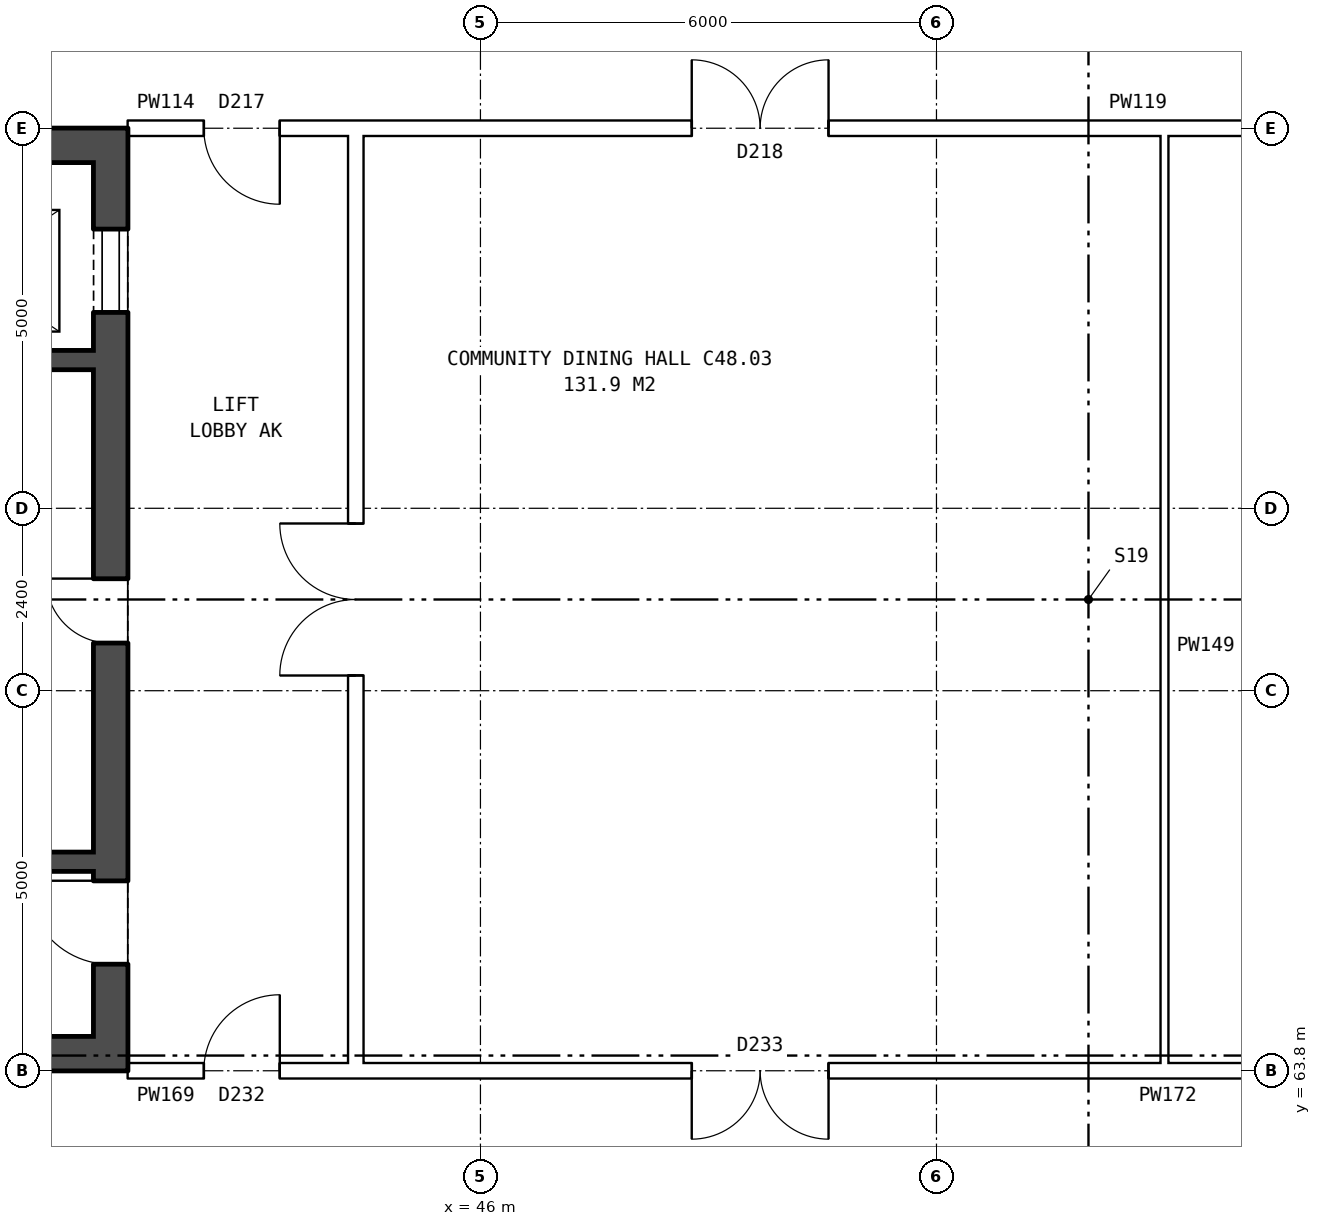
"""IFC4 building model, lengths in metres.
Left out: names, types, materials, properties, quantities, classifications, styles, units other than length and angle.
Written with IfcOpenShell. Run it as: python <this file> out.ifc"""

import sys

from ifc_helpers import new_model, si_unit, direction, frame, frame_2d, origin, place, context, subcontext, project, spatial, rectangle, extrude, element, fill, save


model = new_model("IFC4")
c1 = context("Model", 3, precision=1e-05, world=origin(), true_north=direction((0.0, 1.0)))
c2 = subcontext(c1, "Body", "Model", "MODEL_VIEW")
j1 = project(units=[si_unit("LENGTHUNIT", "METRE"), si_unit("PLANEANGLEUNIT", "RADIAN")], contexts=[c1])
p1 = place(None, origin())
s1 = spatial("IfcSite", under=j1, at=p1, CompositionType="ELEMENT")
p2 = place(p1, origin())
s2 = spatial("IfcBuilding", under=s1, at=p2, CompositionType="ELEMENT")
p3 = place(p2, frame((0.0, 0.0, 171.6)))
s3 = spatial("IfcBuildingStorey", under=s2, at=p3, CompositionType="ELEMENT", Elevation=171.6)
p4 = place(p3, frame((41.135, 76.2, 0.0), z_axis=(0.0, 0.0, 1.0), x_axis=(0.0, -1.0, 0.0)))
e1 = element("IfcWall", 1, at=p4, inside=s3, PredefinedType="SHEAR", context=c2, shape_type="SweptSolid", body=[
    extrude(rectangle(XDim=12.4, YDim=0.45, at=frame_2d((6.2, 0.0))), origin(), (0.0, 0.0, 1.0), 3.6),
])
p5 = place(p4, frame((1.325, 0.0, 0.0)))
e2 = element("IfcOpeningElement", 2, at=p5, cuts=e1, PredefinedType="OPENING", context=c2, shape_type="SweptSolid", body=[
    extrude(rectangle(XDim=1.1, YDim=2.1, at=frame_2d((0.55, 1.05))), frame((0.0, 0.235, 0.0), z_axis=(0.0, -1.0, 0.0), x_axis=(1.0, 0.0, 0.0)), (0.0, 0.0, 1.0), 0.47),
])
p6 = place(p4, frame((5.925, 0.0, 0.0)))
e3 = element("IfcOpeningElement", 3, at=p6, cuts=e1, PredefinedType="OPENING", context=c2, shape_type="SweptSolid", body=[
    extrude(rectangle(XDim=0.85, YDim=2.1, at=frame_2d((0.425, 1.05))), frame((0.0, 0.235, 0.0), z_axis=(0.0, -1.0, 0.0), x_axis=(1.0, 0.0, 0.0)), (0.0, 0.0, 1.0), 0.47),
])
p7 = place(p4, frame((9.9, 0.0, 0.0)))
e4 = element("IfcOpeningElement", 4, at=p7, cuts=e1, PredefinedType="OPENING", context=c2, shape_type="SweptSolid", body=[
    extrude(rectangle(XDim=1.1, YDim=2.1, at=frame_2d((0.55, 1.05))), frame((0.0, 0.235, 0.0), z_axis=(0.0, -1.0, 0.0), x_axis=(1.0, 0.0, 0.0)), (0.0, 0.0, 1.0), 0.47),
])
for number, where, z_axis, x_axis in (
    (5, (40.91, 75.975, 0.0), (0.0, 0.0, 1.0), (-1.0, 0.0, 0.0)),
    (6, (40.91, 64.025, 0.0), (0.0, 0.0, 1.0), (-1.0, 0.0, 0.0)),
):
    element("IfcWall", number, at=place(p3, frame(where, z_axis=z_axis, x_axis=x_axis)), inside=s3, PredefinedType="SHEAR", context=c2, shape_type="SweptSolid", body=[
        extrude(rectangle(XDim=8.1, YDim=0.45, at=frame_2d((4.05, 0.0))), origin(), (0.0, 0.0, 1.0), 3.6),
    ])
p8 = place(p3, frame((40.91, 73.15, 0.0), z_axis=(0.0, 0.0, 1.0), x_axis=(-1.0, 0.0, 0.0)))
e7 = element("IfcWall", 7, at=p8, inside=s3, PredefinedType="SHEAR", context=c2, shape_type="SweptSolid", body=[
    extrude(rectangle(XDim=3.545, YDim=0.25, at=frame_2d((1.772, 0.0))), origin(), (0.0, 0.0, 1.0), 3.6),
])
p9 = place(p3, frame((40.91, 66.55, 0.0), z_axis=(0.0, 0.0, 1.0), x_axis=(-1.0, 0.0, 0.0)))
e8 = element("IfcWall", 8, at=p9, inside=s3, PredefinedType="SHEAR", context=c2, shape_type="SweptSolid", body=[
    extrude(rectangle(XDim=2.475, YDim=0.25, at=frame_2d((1.237, 0.0))), origin(), (0.0, 0.0, 1.0), 3.6),
])
p10 = place(p3, frame((44.36, 63.9, 0.0), z_axis=(0.0, 0.0, 1.0), x_axis=(0.0, 1.0, 0.0)))
e9 = element("IfcWall", 9, at=p10, inside=s3, PredefinedType="PARTITIONING", context=c2, shape_type="SweptSolid", body=[
    extrude(rectangle(XDim=12.2, YDim=0.2, at=frame_2d((6.1, 0.0))), origin(), (0.0, 0.0, 1.0), 3.6),
])
p11 = place(p10, frame((5.1, 0.0, 0.0)))
e10 = element("IfcOpeningElement", 10, at=p11, cuts=e9, PredefinedType="OPENING", context=c2, shape_type="SweptSolid", body=[
    extrude(rectangle(XDim=2.0, YDim=2.1, at=frame_2d((1.0, 1.05))), frame((0.0, 0.11, 0.0), z_axis=(0.0, -1.0, 0.0), x_axis=(1.0, 0.0, 0.0)), (0.0, 0.0, 1.0), 0.22),
])
p12 = place(p3, frame((44.36, 63.8, 0.0), z_axis=(0.0, 0.0, 1.0), x_axis=(1.0, 0.0, 0.0)))
e11 = element("IfcWall", 11, at=p12, inside=s3, PredefinedType="PARTITIONING", context=c2, shape_type="SweptSolid", body=[
    extrude(rectangle(XDim=19.28, YDim=0.2, at=frame_2d((9.64, 0.0))), origin(), (0.0, 0.0, 1.0), 3.6),
])
p13 = place(p12, frame((4.42, 0.0, 0.0)))
e12 = element("IfcOpeningElement", 12, at=p13, cuts=e11, PredefinedType="OPENING", context=c2, shape_type="SweptSolid", body=[
    extrude(rectangle(XDim=1.8, YDim=2.1, at=frame_2d((0.9, 1.05))), frame((0.0, 0.11, 0.0), z_axis=(0.0, -1.0, 0.0), x_axis=(1.0, 0.0, 0.0)), (0.0, 0.0, 1.0), 0.22),
])
p14 = place(p12, frame((14.06, 0.0, 0.0)))
e13 = element("IfcOpeningElement", 13, at=p14, cuts=e11, PredefinedType="OPENING", context=c2, shape_type="SweptSolid", body=[
    extrude(rectangle(XDim=1.8, YDim=2.1, at=frame_2d((0.9, 1.05))), frame((0.0, 0.11, 0.0), z_axis=(0.0, -1.0, 0.0), x_axis=(1.0, 0.0, 0.0)), (0.0, 0.0, 1.0), 0.22),
])
p15 = place(p3, frame((41.36, 63.8, 0.0), z_axis=(0.0, 0.0, 1.0), x_axis=(1.0, 0.0, 0.0)))
e14 = element("IfcWall", 14, at=p15, inside=s3, PredefinedType="PARTITIONING", context=c2, shape_type="SweptSolid", body=[
    extrude(rectangle(XDim=3.0, YDim=0.2, at=frame_2d((1.5, 0.0))), origin(), (0.0, 0.0, 1.0), 3.6),
])
p16 = place(p15, frame((1.0, 0.0, 0.0)))
e15 = element("IfcOpeningElement", 15, at=p16, cuts=e14, PredefinedType="OPENING", context=c2, shape_type="SweptSolid", body=[
    extrude(rectangle(XDim=1.0, YDim=2.1, at=frame_2d((0.5, 1.05))), frame((0.0, 0.11, 0.0), z_axis=(0.0, -1.0, 0.0), x_axis=(1.0, 0.0, 0.0)), (0.0, 0.0, 1.0), 0.22),
])
p17 = place(p3, frame((44.36, 76.2, 0.0), z_axis=(0.0, 0.0, 1.0), x_axis=(1.0, 0.0, 0.0)))
e16 = element("IfcWall", 16, at=p17, inside=s3, PredefinedType="PARTITIONING", context=c2, shape_type="SweptSolid", body=[
    extrude(rectangle(XDim=19.28, YDim=0.2, at=frame_2d((9.64, 0.0))), origin(), (0.0, 0.0, 1.0), 3.6),
])
p18 = place(p17, frame((4.42, 0.0, 0.0)))
e17 = element("IfcOpeningElement", 17, at=p18, cuts=e16, PredefinedType="OPENING", context=c2, shape_type="SweptSolid", body=[
    extrude(rectangle(XDim=1.8, YDim=2.1, at=frame_2d((0.9, 1.05))), frame((0.0, 0.11, 0.0), z_axis=(0.0, -1.0, 0.0), x_axis=(1.0, 0.0, 0.0)), (0.0, 0.0, 1.0), 0.22),
])
p19 = place(p17, frame((14.36, 0.0, 0.0)))
e18 = element("IfcOpeningElement", 18, at=p19, cuts=e16, PredefinedType="OPENING", context=c2, shape_type="SweptSolid", body=[
    extrude(rectangle(XDim=1.2, YDim=2.1, at=frame_2d((0.6, 1.05))), frame((0.0, 0.11, 0.0), z_axis=(0.0, -1.0, 0.0), x_axis=(1.0, 0.0, 0.0)), (0.0, 0.0, 1.0), 0.22),
])
p20 = place(p3, frame((41.36, 76.2, 0.0), z_axis=(0.0, 0.0, 1.0), x_axis=(1.0, 0.0, 0.0)))
e19 = element("IfcWall", 19, at=p20, inside=s3, PredefinedType="PARTITIONING", context=c2, shape_type="SweptSolid", body=[
    extrude(rectangle(XDim=3.0, YDim=0.2, at=frame_2d((1.5, 0.0))), origin(), (0.0, 0.0, 1.0), 3.6),
])
p21 = place(p20, frame((1.0, 0.0, 0.0)))
e20 = element("IfcOpeningElement", 20, at=p21, cuts=e19, PredefinedType="OPENING", context=c2, shape_type="SweptSolid", body=[
    extrude(rectangle(XDim=1.0, YDim=2.1, at=frame_2d((0.5, 1.05))), frame((0.0, 0.11, 0.0), z_axis=(0.0, -1.0, 0.0), x_axis=(1.0, 0.0, 0.0)), (0.0, 0.0, 1.0), 0.22),
])
p22 = place(p3, frame((55.0, 63.7, 0.0), z_axis=(0.0, 0.0, 1.0), x_axis=(0.0, 1.0, 0.0)))
e21 = element("IfcWall", 21, at=p22, inside=s3, PredefinedType="PARTITIONING", context=c2, shape_type="SweptSolid", body=[
    extrude(rectangle(XDim=12.6, YDim=0.1, at=frame_2d((6.3, 0.0))), origin(), (0.0, 0.0, 1.0), 3.6),
])
p23 = place(p5, origin())
e22 = element("IfcDoor", 22, at=p23, inside=s3, OperationType="DOUBLE_DOOR_SLIDING", PredefinedType="DOOR", context=c2, shape_type="SweptSolid", body=[
    extrude(rectangle(XDim=1.1, YDim=2.1, at=frame_2d((0.55, 1.05))), frame((0.0, -0.16, 0.0), z_axis=(0.0, -1.0, 0.0), x_axis=(1.0, 0.0, 0.0)), (0.0, 0.0, 1.0), 0.05),
])
fill(e2, e22)
p24 = place(p6, frame((0.85, 0.0, 0.0), z_axis=(0.0, 0.0, 1.0), x_axis=(-1.0, 0.0, 0.0)))
e23 = element("IfcDoor", 23, at=p24, inside=s3, OperationType="SINGLE_SWING_RIGHT", PredefinedType="DOOR", context=c2, shape_type="SweptSolid", body=[
    extrude(rectangle(XDim=0.85, YDim=2.1, at=frame_2d((0.425, 1.05))), frame((0.0, 0.21, 0.0), z_axis=(0.0, -1.0, 0.0), x_axis=(1.0, 0.0, 0.0)), (0.0, 0.0, 1.0), 0.05),
])
fill(e3, e23)
p25 = place(p7, frame((1.1, 0.0, 0.0), z_axis=(0.0, 0.0, 1.0), x_axis=(-1.0, 0.0, 0.0)))
e24 = element("IfcDoor", 24, at=p25, inside=s3, OperationType="SINGLE_SWING_RIGHT", PredefinedType="DOOR", context=c2, shape_type="SweptSolid", body=[
    extrude(rectangle(XDim=1.1, YDim=2.1, at=frame_2d((0.55, 1.05))), frame((0.0, 0.21, 0.0), z_axis=(0.0, -1.0, 0.0), x_axis=(1.0, 0.0, 0.0)), (0.0, 0.0, 1.0), 0.05),
])
fill(e4, e24)
p26 = place(p11, origin())
e25 = element("IfcDoor", 25, at=p26, inside=s3, OperationType="DOUBLE_DOOR_SINGLE_SWING", PredefinedType="DOOR", context=c2, shape_type="SweptSolid", body=[
    extrude(rectangle(XDim=2.0, YDim=2.1, at=frame_2d((1.0, 1.05))), frame((0.0, 0.025, 0.0), z_axis=(0.0, -1.0, 0.0), x_axis=(1.0, 0.0, 0.0)), (0.0, 0.0, 1.0), 0.05),
])
fill(e10, e25)
p27 = place(p13, frame((1.8, 0.0, 0.0), z_axis=(0.0, 0.0, 1.0), x_axis=(-1.0, 0.0, 0.0)))
e26 = element("IfcDoor", 26, at=p27, inside=s3, OperationType="DOUBLE_DOOR_SINGLE_SWING", PredefinedType="DOOR", context=c2, shape_type="SweptSolid", body=[
    extrude(rectangle(XDim=1.8, YDim=2.1, at=frame_2d((0.9, 1.05))), frame((0.0, 0.025, 0.0), z_axis=(0.0, -1.0, 0.0), x_axis=(1.0, 0.0, 0.0)), (0.0, 0.0, 1.0), 0.05),
])
fill(e12, e26)
p28 = place(p16, origin())
e27 = element("IfcDoor", 27, at=p28, inside=s3, OperationType="SINGLE_SWING_RIGHT", PredefinedType="DOOR", context=c2, shape_type="SweptSolid", body=[
    extrude(rectangle(XDim=1.0, YDim=2.1, at=frame_2d((0.5, 1.05))), frame((0.0, 0.025, 0.0), z_axis=(0.0, -1.0, 0.0), x_axis=(1.0, 0.0, 0.0)), (0.0, 0.0, 1.0), 0.05),
])
fill(e15, e27)
p29 = place(p18, origin())
e28 = element("IfcDoor", 28, at=p29, inside=s3, OperationType="DOUBLE_DOOR_SINGLE_SWING", PredefinedType="DOOR", context=c2, shape_type="SweptSolid", body=[
    extrude(rectangle(XDim=1.8, YDim=2.1, at=frame_2d((0.9, 1.05))), frame((0.0, 0.025, 0.0), z_axis=(0.0, -1.0, 0.0), x_axis=(1.0, 0.0, 0.0)), (0.0, 0.0, 1.0), 0.05),
])
fill(e17, e28)
p30 = place(p21, frame((1.0, 0.0, 0.0), z_axis=(0.0, 0.0, 1.0), x_axis=(-1.0, 0.0, 0.0)))
e29 = element("IfcDoor", 29, at=p30, inside=s3, OperationType="SINGLE_SWING_LEFT", PredefinedType="DOOR", context=c2, shape_type="SweptSolid", body=[
    extrude(rectangle(XDim=1.0, YDim=2.1, at=frame_2d((0.5, 1.05))), frame((0.0, 0.025, 0.0), z_axis=(0.0, -1.0, 0.0), x_axis=(1.0, 0.0, 0.0)), (0.0, 0.0, 1.0), 0.05),
])
fill(e20, e29)
save(model, sys.argv[1])
